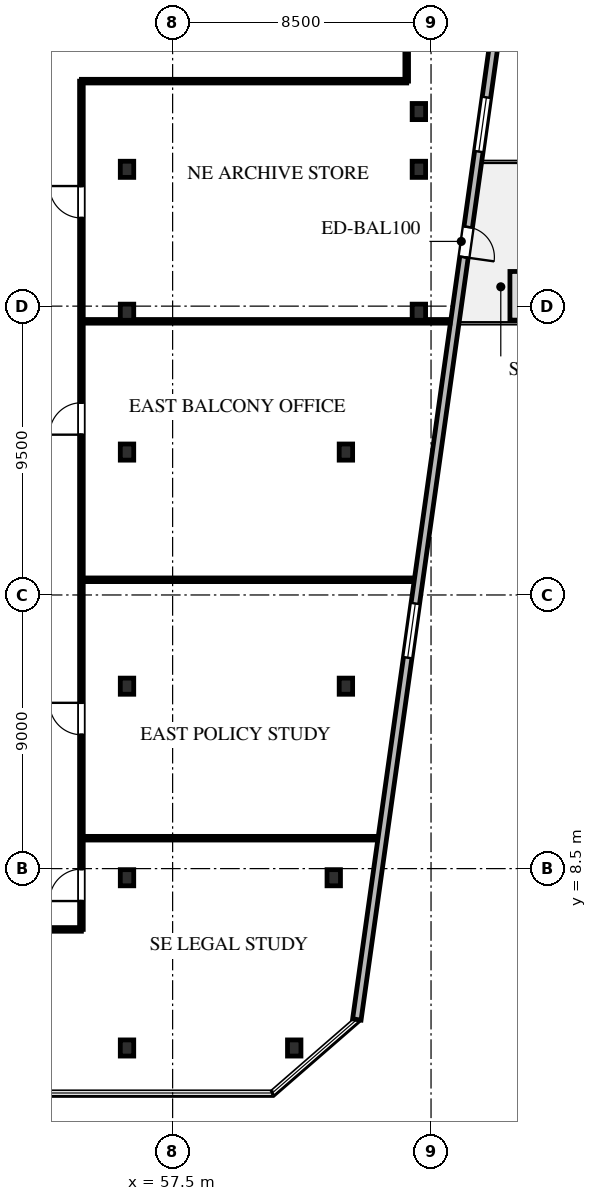
"""IFC4 building model, lengths in metres.
Left out: names, types, materials, properties, quantities, classifications, styles, units other than length and angle.
Written with IfcOpenShell. Run it as: python <this file> out.ifc"""

import sys

from ifc_helpers import new_model, si_unit, direction, frame, frame_2d, origin, origin_2d, place, context, subcontext, project, spatial, rectangle, i_section, extrude, element, fill, save


model = new_model("IFC4")
c1 = context("Model", 3, precision=1e-05, world=origin(), true_north=direction((0.0, 1.0)))
c2 = subcontext(c1, "Body", "Model", "MODEL_VIEW")
j1 = project(units=[si_unit("LENGTHUNIT", "METRE"), si_unit("PLANEANGLEUNIT", "RADIAN")], contexts=[c1])
p1 = place(None, origin())
s1 = spatial("IfcSite", under=j1, at=p1, CompositionType="ELEMENT")
p2 = place(p1, origin())
s2 = spatial("IfcBuilding", under=s1, at=p2, CompositionType="ELEMENT")
p3 = place(p2, frame((0.0, 0.0, 53.5)))
s3 = spatial("IfcBuildingStorey", under=s2, at=p3, CompositionType="ELEMENT", Elevation=53.5)
for number, where, z_axis, x_axis in (
    (1, (56.0, 14.5, 0.0), (0.0, 0.0, 1.0), (1.0, 0.0, 0.0)),
    (2, (63.2, 14.5, 0.0), (0.0, 0.0, 1.0), (1.0, 0.0, 0.0)),
    (3, (56.0, 22.2, 0.0), (0.0, 0.0, 1.0), (1.0, 0.0, 0.0)),
    (4, (63.2, 22.2, 0.0), (0.0, 0.0, 1.0), (1.0, 0.0, 0.0)),
    (5, (56.0, 26.8, 0.0), (0.0, 0.0, 1.0), (1.0, 0.0, 0.0)),
    (6, (65.6, 26.8, 0.0), (0.0, 0.0, 1.0), (1.0, 0.0, 0.0)),
    (7, (56.0, 31.5, 0.0), (0.0, 0.0, 1.0), (1.0, 0.0, 0.0)),
    (8, (65.6, 31.5, 0.0), (0.0, 0.0, 1.0), (1.0, 0.0, 0.0)),
    (9, (56.0, 2.6, 0.0), (0.0, 0.0, 1.0), (1.0, 0.0, 0.0)),
    (10, (61.5, 2.6, 0.0), (0.0, 0.0, 1.0), (1.0, 0.0, 0.0)),
    (11, (56.0, 8.2, 0.0), (0.0, 0.0, 1.0), (1.0, 0.0, 0.0)),
    (12, (62.8, 8.2, 0.0), (0.0, 0.0, 1.0), (1.0, 0.0, 0.0)),
    (13, (65.6, 33.4, 0.0), (0.0, 0.0, 1.0), (1.0, 0.0, 0.0)),
):
    element("IfcColumn", number, at=place(p3, frame(where, z_axis=z_axis, x_axis=x_axis)), inside=s3, PredefinedType="COLUMN", context=c2, shape_type="SweptSolid", body=[
        extrude(i_section(OverallWidth=0.442, OverallDepth=0.531, WebThickness=0.066, FlangeThickness=0.106, FilletRadius=0.03, at=origin_2d()), origin(), (0.0, 0.0, 1.0), 4.0),
    ])
p4 = place(p3, frame((68.375, 37.8, 0.0), z_axis=(0.0, 0.0, 1.0), x_axis=(-0.139174610616, -0.990267856572, 0.0)))
e14 = element("IfcWall", 14, at=p4, inside=s3, PredefinedType="STANDARD", context=c2, shape_type="SweptSolid", body=[
    extrude(rectangle(XDim=34.6, YDim=0.28, at=frame_2d((17.3, 0.0))), origin(), (0.0, 0.0, 1.0), 3.74),
])
p5 = place(p4, frame((8.279, 0.0, 0.0)))
e15 = element("IfcOpeningElement", 15, at=p5, cuts=e14, PredefinedType="OPENING", context=c2, shape_type="SweptSolid", body=[
    extrude(rectangle(XDim=1.0, YDim=2.15, at=frame_2d((0.5, 1.075))), frame((0.0, 0.15, 0.0), z_axis=(0.0, -1.0, 0.0), x_axis=(1.0, 0.0, 0.0)), (0.0, 0.0, 1.0), 0.3),
])
p6 = place(p4, frame((3.972, 0.0, 0.65)))
e16 = element("IfcOpeningElement", 16, at=p6, cuts=e14, PredefinedType="OPENING", context=c2, shape_type="SweptSolid", body=[
    extrude(rectangle(XDim=1.8, YDim=2.1, at=frame_2d((0.9, 1.05))), frame((0.0, 0.15, 0.0), z_axis=(0.0, -1.0, 0.0), x_axis=(1.0, 0.0, 0.0)), (0.0, 0.0, 1.0), 0.3),
])
p7 = place(p4, frame((20.783, 0.0, 0.65)))
e17 = element("IfcOpeningElement", 17, at=p7, cuts=e14, PredefinedType="OPENING", context=c2, shape_type="SweptSolid", body=[
    extrude(rectangle(XDim=1.8, YDim=2.1, at=frame_2d((0.9, 1.05))), frame((0.0, 0.15, 0.0), z_axis=(0.0, -1.0, 0.0), x_axis=(1.0, 0.0, 0.0)), (0.0, 0.0, 1.0), 0.3),
])
p8 = place(p3, frame((54.5, 34.4, 0.0), z_axis=(0.0, 0.0, 1.0), x_axis=(1.0, 0.0, 0.0)))
e18 = element("IfcWall", 18, at=p8, inside=s3, PredefinedType="PARTITIONING", context=c2, shape_type="SweptSolid", body=[
    extrude(rectangle(XDim=10.7, YDim=0.12, at=frame_2d((5.35, 0.0))), origin(), (0.0, 0.0, 1.0), 2.813),
])
p9 = place(p3, frame((65.2, 34.4, 0.0), z_axis=(0.0, 0.0, 1.0), x_axis=(0.0, 1.0, 0.0)))
e19 = element("IfcWall", 19, at=p9, inside=s3, PredefinedType="PARTITIONING", context=c2, shape_type="SweptSolid", body=[
    extrude(rectangle(XDim=3.217, YDim=0.12, at=frame_2d((1.608, 0.0))), origin(), (0.0, 0.0, 1.0), 2.813),
])
p10 = place(p3, frame((54.5, 6.5, 0.0), z_axis=(0.0, 0.0, 1.0), x_axis=(0.0, 1.0, 0.0)))
e20 = element("IfcWall", 20, at=p10, inside=s3, PredefinedType="PARTITIONING", context=c2, shape_type="SweptSolid", body=[
    extrude(rectangle(XDim=27.9, YDim=0.12, at=frame_2d((13.95, 0.0))), origin(), (0.0, 0.0, 1.0), 2.813),
])
p11 = place(p10, frame((0.933, 0.0, 0.0)))
e21 = element("IfcOpeningElement", 21, at=p11, cuts=e20, PredefinedType="OPENING", context=c2, shape_type="SweptSolid", body=[
    extrude(rectangle(XDim=1.05, YDim=2.2, at=frame_2d((0.525, 1.1))), frame((0.0, 0.07, 0.0), z_axis=(0.0, -1.0, 0.0), x_axis=(1.0, 0.0, 0.0)), (0.0, 0.0, 1.0), 0.14),
])
p12 = place(p10, frame((6.403, 0.0, 0.0)))
e22 = element("IfcOpeningElement", 22, at=p12, cuts=e20, PredefinedType="OPENING", context=c2, shape_type="SweptSolid", body=[
    extrude(rectangle(XDim=1.05, YDim=2.2, at=frame_2d((0.525, 1.1))), frame((0.0, 0.07, 0.0), z_axis=(0.0, -1.0, 0.0), x_axis=(1.0, 0.0, 0.0)), (0.0, 0.0, 1.0), 0.14),
])
p13 = place(p10, frame((16.272, 0.0, 0.0)))
e23 = element("IfcOpeningElement", 23, at=p13, cuts=e20, PredefinedType="OPENING", context=c2, shape_type="SweptSolid", body=[
    extrude(rectangle(XDim=1.05, YDim=2.2, at=frame_2d((0.525, 1.1))), frame((0.0, 0.07, 0.0), z_axis=(0.0, -1.0, 0.0), x_axis=(1.0, 0.0, 0.0)), (0.0, 0.0, 1.0), 0.14),
])
p14 = place(p10, frame((23.4, 0.0, 0.0)))
e24 = element("IfcOpeningElement", 24, at=p14, cuts=e20, PredefinedType="OPENING", context=c2, shape_type="SweptSolid", body=[
    extrude(rectangle(XDim=1.05, YDim=2.2, at=frame_2d((0.525, 1.1))), frame((0.0, 0.07, 0.0), z_axis=(0.0, -1.0, 0.0), x_axis=(1.0, 0.0, 0.0)), (0.0, 0.0, 1.0), 0.14),
])
p15 = place(p3, frame((52.5, 6.5, 0.0), z_axis=(0.0, 0.0, 1.0), x_axis=(1.0, 0.0, 0.0)))
e25 = element("IfcWall", 25, at=p15, inside=s3, PredefinedType="PARTITIONING", context=c2, shape_type="SweptSolid", body=[
    extrude(rectangle(XDim=2.0, YDim=0.12, at=frame_2d((1.0, 0.0))), origin(), (0.0, 0.0, 1.0), 2.978),
])
p16 = place(p3, frame((54.568, 9.5, 0.0), z_axis=(0.0, 0.0, 1.0), x_axis=(1.0, 0.0, 0.0)))
e26 = element("IfcWall", 26, at=p16, inside=s3, PredefinedType="PARTITIONING", context=c2, shape_type="SweptSolid", body=[
    extrude(rectangle(XDim=9.663, YDim=0.12, at=frame_2d((4.832, 0.0))), origin(), (0.0, 0.0, 1.0), 2.813),
])
p17 = place(p3, frame((54.568, 18.0, 0.0), z_axis=(0.0, 0.0, 1.0), x_axis=(1.0, 0.0, 0.0)))
e27 = element("IfcWall", 27, at=p17, inside=s3, PredefinedType="PARTITIONING", context=c2, shape_type="SweptSolid", body=[
    extrude(rectangle(XDim=10.858, YDim=0.12, at=frame_2d((5.429, 0.0))), origin(), (0.0, 0.0, 1.0), 2.813),
])
p18 = place(p3, frame((54.568, 26.5, 0.0), z_axis=(0.0, 0.0, 1.0), x_axis=(1.0, 0.0, 0.0)))
e28 = element("IfcWall", 28, at=p18, inside=s3, PredefinedType="PARTITIONING", context=c2, shape_type="SweptSolid", body=[
    extrude(rectangle(XDim=12.052, YDim=0.12, at=frame_2d((6.026, 0.0))), origin(), (0.0, 0.0, 1.0), 2.813),
])
p19 = place(p5, origin())
e29 = element("IfcDoor", 29, at=p19, inside=s3, OperationType="SINGLE_SWING_RIGHT", PredefinedType="DOOR", context=c2, shape_type="SweptSolid", body=[
    extrude(rectangle(XDim=1.0, YDim=2.15, at=frame_2d((0.5, 1.075))), frame((0.0, 0.025, 0.0), z_axis=(0.0, -1.0, 0.0), x_axis=(1.0, 0.0, 0.0)), (0.0, 0.0, 1.0), 0.05),
])
fill(e15, e29)
p20 = place(p6, origin())
e30 = element("IfcWindow", 30, at=p20, inside=s3, PartitioningType="SINGLE_PANEL", PredefinedType="WINDOW", context=c2, shape_type="SweptSolid", body=[
    extrude(rectangle(XDim=1.8, YDim=2.1, at=frame_2d((0.9, 1.05))), frame((0.0, 0.03, 0.0), z_axis=(0.0, -1.0, 0.0), x_axis=(1.0, 0.0, 0.0)), (0.0, 0.0, 1.0), 0.06),
])
fill(e16, e30)
p21 = place(p7, origin())
e31 = element("IfcWindow", 31, at=p21, inside=s3, PartitioningType="SINGLE_PANEL", PredefinedType="WINDOW", context=c2, shape_type="SweptSolid", body=[
    extrude(rectangle(XDim=1.8, YDim=2.1, at=frame_2d((0.9, 1.05))), frame((0.0, 0.03, 0.0), z_axis=(0.0, -1.0, 0.0), x_axis=(1.0, 0.0, 0.0)), (0.0, 0.0, 1.0), 0.06),
])
fill(e17, e31)
p22 = place(p11, origin())
e32 = element("IfcDoor", 32, at=p22, inside=s3, OperationType="SINGLE_SWING_LEFT", PredefinedType="DOOR", context=c2, shape_type="SweptSolid", body=[
    extrude(rectangle(XDim=1.05, YDim=2.2, at=frame_2d((0.525, 1.1))), frame((0.0, 0.025, 0.0), z_axis=(0.0, -1.0, 0.0), x_axis=(1.0, 0.0, 0.0)), (0.0, 0.0, 1.0), 0.05),
])
fill(e21, e32)
p23 = place(p12, origin())
e33 = element("IfcDoor", 33, at=p23, inside=s3, OperationType="SINGLE_SWING_RIGHT", PredefinedType="DOOR", context=c2, shape_type="SweptSolid", body=[
    extrude(rectangle(XDim=1.05, YDim=2.2, at=frame_2d((0.525, 1.1))), frame((0.0, 0.025, 0.0), z_axis=(0.0, -1.0, 0.0), x_axis=(1.0, 0.0, 0.0)), (0.0, 0.0, 1.0), 0.05),
])
fill(e22, e33)
p24 = place(p13, origin())
e34 = element("IfcDoor", 34, at=p24, inside=s3, OperationType="SINGLE_SWING_LEFT", PredefinedType="DOOR", context=c2, shape_type="SweptSolid", body=[
    extrude(rectangle(XDim=1.05, YDim=2.2, at=frame_2d((0.525, 1.1))), frame((0.0, 0.025, 0.0), z_axis=(0.0, -1.0, 0.0), x_axis=(1.0, 0.0, 0.0)), (0.0, 0.0, 1.0), 0.05),
])
fill(e23, e34)
p25 = place(p14, origin())
e35 = element("IfcDoor", 35, at=p25, inside=s3, OperationType="SINGLE_SWING_RIGHT", PredefinedType="DOOR", context=c2, shape_type="SweptSolid", body=[
    extrude(rectangle(XDim=1.05, YDim=2.2, at=frame_2d((0.525, 1.1))), frame((0.0, 0.025, 0.0), z_axis=(0.0, -1.0, 0.0), x_axis=(1.0, 0.0, 0.0)), (0.0, 0.0, 1.0), 0.05),
])
fill(e24, e35)
save(model, sys.argv[1])
